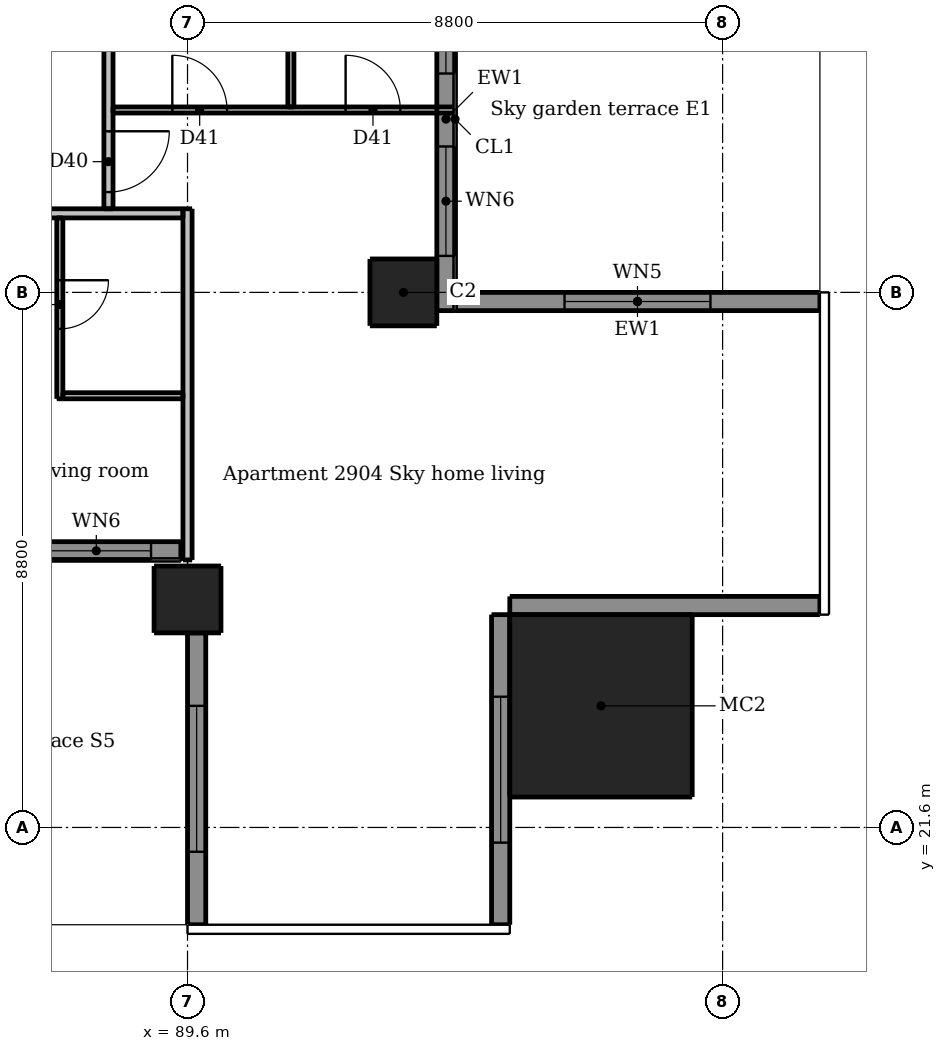
"""IFC4 building model, lengths in metres.
Left out: names, types, materials, properties, quantities, classifications, styles, units other than length and angle.
Written with IfcOpenShell. Run it as: python <this file> out.ifc"""

import sys

from ifc_helpers import new_model, si_unit, direction, frame, frame_2d, origin, origin_2d, place, context, subcontext, project, spatial, rectangle, extrude, element, fill, save


model = new_model("IFC4")
c1 = context("Model", 3, precision=1e-05, world=origin(), true_north=direction((0.0, 1.0)))
c2 = subcontext(c1, "Body", "Model", "MODEL_VIEW")
j1 = project(units=[si_unit("LENGTHUNIT", "METRE"), si_unit("PLANEANGLEUNIT", "RADIAN")], contexts=[c1])
p1 = place(None, origin())
s1 = spatial("IfcSite", under=j1, at=p1, CompositionType="ELEMENT")
p2 = place(p1, origin())
s2 = spatial("IfcBuilding", under=s1, at=p2, CompositionType="ELEMENT")
p3 = place(p2, frame((0.0, 0.0, 108.4)))
s3 = spatial("IfcBuildingStorey", under=s2, at=p3, CompositionType="ELEMENT", Elevation=108.4)
for number, where, z_axis, x_axis in (
    (1, (89.6, 25.35, 0.0), (0.0, 0.0, 1.0), (1.0, 0.0, 0.0)),
    (2, (93.15, 30.4, 0.0), (0.0, 0.0, 1.0), (1.0, 0.0, 0.0)),
):
    element("IfcColumn", number, at=place(p3, frame(where, z_axis=z_axis, x_axis=x_axis)), inside=s3, PredefinedType="COLUMN", context=c2, shape_type="SweptSolid", body=[
        extrude(rectangle(XDim=1.1, YDim=1.1, at=origin_2d()), origin(), (0.0, 0.0, 1.0), 3.05),
    ])
p4 = place(p3, frame((96.4, 23.6, 0.0), z_axis=(0.0, 0.0, 1.0), x_axis=(1.0, 0.0, 0.0)))
e3 = element("IfcColumn", 3, at=p4, inside=s3, PredefinedType="COLUMN", context=c2, shape_type="SweptSolid", body=[
    extrude(rectangle(XDim=3.0, YDim=3.0, at=origin_2d()), origin(), (0.0, 0.0, 1.0), 3.3),
])
p5 = place(p3, frame((89.75, 24.8, 0.0), z_axis=(0.0, 0.0, 1.0), x_axis=(0.0, -1.0, 0.0)))
e4 = element("IfcWall", 4, at=p5, inside=s3, PredefinedType="SOLIDWALL", context=c2, shape_type="SweptSolid", body=[
    extrude(rectangle(XDim=4.8, YDim=0.3, at=frame_2d((2.4, 0.0))), origin(), (0.0, 0.0, 1.0), 3.05),
])
p6 = place(p5, frame((1.2, 0.0, 0.15)))
e5 = element("IfcOpeningElement", 5, at=p6, cuts=e4, PredefinedType="OPENING", context=c2, shape_type="SweptSolid", body=[
    extrude(rectangle(XDim=2.4, YDim=2.1, at=frame_2d((1.2, 1.05))), frame((0.0, 0.16, 0.0), z_axis=(0.0, -1.0, 0.0), x_axis=(1.0, 0.0, 0.0)), (0.0, 0.0, 1.0), 0.32),
])
p7 = place(p3, frame((94.75, 20.0, 0.0), z_axis=(0.0, 0.0, 1.0), x_axis=(0.0, 1.0, 0.0)))
e6 = element("IfcWall", 6, at=p7, inside=s3, PredefinedType="SOLIDWALL", context=c2, shape_type="SweptSolid", body=[
    extrude(rectangle(XDim=5.1, YDim=0.3, at=frame_2d((2.55, 0.0))), origin(), (0.0, 0.0, 1.0), 3.05),
])
p8 = place(p7, frame((1.35, 0.0, 0.15)))
e7 = element("IfcOpeningElement", 7, at=p8, cuts=e6, PredefinedType="OPENING", context=c2, shape_type="SweptSolid", body=[
    extrude(rectangle(XDim=2.4, YDim=2.1, at=frame_2d((1.2, 1.05))), frame((0.0, 0.16, 0.0), z_axis=(0.0, -1.0, 0.0), x_axis=(1.0, 0.0, 0.0)), (0.0, 0.0, 1.0), 0.32),
])
p9 = place(p3, frame((94.9, 25.25, 0.0), z_axis=(0.0, 0.0, 1.0), x_axis=(1.0, 0.0, 0.0)))
e8 = element("IfcWall", 8, at=p9, inside=s3, PredefinedType="SOLIDWALL", context=c2, shape_type="SweptSolid", body=[
    extrude(rectangle(XDim=5.1, YDim=0.3, at=frame_2d((2.55, 0.0))), origin(), (0.0, 0.0, 1.0), 3.05),
])
p10 = place(p3, frame((100.0, 30.25, 0.0), z_axis=(0.0, 0.0, 1.0), x_axis=(-1.0, 0.0, 0.0)))
e9 = element("IfcWall", 9, at=p10, inside=s3, PredefinedType="SOLIDWALL", context=c2, shape_type="SweptSolid", body=[
    extrude(rectangle(XDim=6.0, YDim=0.3, at=frame_2d((3.0, 0.0))), origin(), (0.0, 0.0, 1.0), 3.05),
])
p11 = place(p10, frame((1.8, 0.0, 0.15)))
e10 = element("IfcOpeningElement", 10, at=p11, cuts=e9, PredefinedType="OPENING", context=c2, shape_type="SweptSolid", body=[
    extrude(rectangle(XDim=2.4, YDim=2.1, at=frame_2d((1.2, 1.05))), frame((0.0, 0.16, 0.0), z_axis=(0.0, -1.0, 0.0), x_axis=(1.0, 0.0, 0.0)), (0.0, 0.0, 1.0), 0.32),
])
p12 = place(p3, frame((83.6, 26.15, 0.0), z_axis=(0.0, 0.0, 1.0), x_axis=(1.0, 0.0, 0.0)))
e11 = element("IfcWall", 11, at=p12, inside=s3, PredefinedType="SOLIDWALL", context=c2, shape_type="SweptSolid", body=[
    extrude(rectangle(XDim=5.89, YDim=0.3, at=frame_2d((2.945, 0.0))), origin(), (0.0, 0.0, 1.0), 3.05),
])
p13 = place(p12, frame((0.6, 0.0, 0.15)))
e12 = element("IfcOpeningElement", 12, at=p13, cuts=e11, PredefinedType="OPENING", context=c2, shape_type="SweptSolid", body=[
    extrude(rectangle(XDim=1.8, YDim=2.1, at=frame_2d((0.9, 1.05))), frame((0.0, 0.16, 0.0), z_axis=(0.0, -1.0, 0.0), x_axis=(1.0, 0.0, 0.0)), (0.0, 0.0, 1.0), 0.32),
])
p14 = place(p12, frame((3.6, 0.0, 0.15)))
e13 = element("IfcOpeningElement", 13, at=p14, cuts=e11, PredefinedType="OPENING", context=c2, shape_type="SweptSolid", body=[
    extrude(rectangle(XDim=1.8, YDim=2.1, at=frame_2d((0.9, 1.05))), frame((0.0, 0.16, 0.0), z_axis=(0.0, -1.0, 0.0), x_axis=(1.0, 0.0, 0.0)), (0.0, 0.0, 1.0), 0.32),
])
p15 = place(p3, frame((93.85, 30.1, 0.0), z_axis=(0.0, 0.0, 1.0), x_axis=(0.0, 1.0, 0.0)))
e14 = element("IfcWall", 14, at=p15, inside=s3, PredefinedType="SOLIDWALL", context=c2, shape_type="SweptSolid", body=[
    extrude(rectangle(XDim=6.3, YDim=0.3, at=frame_2d((3.15, 0.0))), origin(), (0.0, 0.0, 1.0), 3.05),
])
p16 = place(p15, frame((0.9, 0.0, 0.15)))
e15 = element("IfcOpeningElement", 15, at=p16, cuts=e14, PredefinedType="OPENING", context=c2, shape_type="SweptSolid", body=[
    extrude(rectangle(XDim=1.8, YDim=2.1, at=frame_2d((0.9, 1.05))), frame((0.0, 0.16, 0.0), z_axis=(0.0, -1.0, 0.0), x_axis=(1.0, 0.0, 0.0)), (0.0, 0.0, 1.0), 0.32),
])
p17 = place(p15, frame((3.9, 0.0, 0.15)))
e16 = element("IfcOpeningElement", 16, at=p17, cuts=e14, PredefinedType="OPENING", context=c2, shape_type="SweptSolid", body=[
    extrude(rectangle(XDim=1.8, YDim=2.1, at=frame_2d((0.9, 1.05))), frame((0.0, 0.16, 0.0), z_axis=(0.0, -1.0, 0.0), x_axis=(1.0, 0.0, 0.0)), (0.0, 0.0, 1.0), 0.32),
])
p18 = place(p3, frame((87.5, 31.625, 0.0), z_axis=(0.0, 0.0, 1.0), x_axis=(0.0, -1.0, 0.0)))
e17 = element("IfcWall", 17, at=p18, inside=s3, PredefinedType="PARTITIONING", context=c2, shape_type="SweptSolid", body=[
    extrude(rectangle(XDim=2.975, YDim=0.1, at=frame_2d((1.488, 0.0))), origin(), (0.0, 0.0, 1.0), 3.05),
])
p19 = place(p18, frame((1.025, 0.0, 0.0)))
e18 = element("IfcOpeningElement", 18, at=p19, cuts=e17, PredefinedType="OPENING", context=c2, shape_type="SweptSolid", body=[
    extrude(rectangle(XDim=0.8, YDim=2.1, at=frame_2d((0.4, 1.05))), frame((0.0, 0.06, 0.0), z_axis=(0.0, -1.0, 0.0), x_axis=(1.0, 0.0, 0.0)), (0.0, 0.0, 1.0), 0.12),
])
p20 = place(p3, frame((91.3, 33.45, 0.0), z_axis=(0.0, 0.0, 1.0), x_axis=(0.0, 1.0, 0.0)))
e19 = element("IfcWall", 19, at=p20, inside=s3, PredefinedType="PARTITIONING", context=c2, shape_type="SweptSolid", body=[
    extrude(rectangle(XDim=5.875, YDim=0.1, at=frame_2d((2.938, 0.0))), origin(), (0.0, 0.0, 1.0), 3.05),
])
p21 = place(p20, frame((3.75, 0.0, 0.0)))
e20 = element("IfcOpeningElement", 20, at=p21, cuts=e19, PredefinedType="OPENING", context=c2, shape_type="SweptSolid", body=[
    extrude(rectangle(XDim=0.8, YDim=2.1, at=frame_2d((0.4, 1.05))), frame((0.0, 0.06, 0.0), z_axis=(0.0, -1.0, 0.0), x_axis=(1.0, 0.0, 0.0)), (0.0, 0.0, 1.0), 0.12),
])
p22 = place(p3, frame((88.375, 33.4, 0.0), z_axis=(0.0, 0.0, 1.0), x_axis=(1.0, 0.0, 0.0)))
e21 = element("IfcWall", 21, at=p22, inside=s3, PredefinedType="PARTITIONING", context=c2, shape_type="SweptSolid", body=[
    extrude(rectangle(XDim=5.625, YDim=0.1, at=frame_2d((2.812, 0.0))), origin(), (0.0, 0.0, 1.0), 3.05),
])
p23 = place(p22, frame((0.975, 0.0, 0.0)))
e22 = element("IfcOpeningElement", 22, at=p23, cuts=e21, PredefinedType="OPENING", context=c2, shape_type="SweptSolid", body=[
    extrude(rectangle(XDim=0.9, YDim=2.1, at=frame_2d((0.45, 1.05))), frame((0.0, 0.06, 0.0), z_axis=(0.0, -1.0, 0.0), x_axis=(1.0, 0.0, 0.0)), (0.0, 0.0, 1.0), 0.12),
])
p24 = place(p22, frame((3.825, 0.0, 0.0)))
e23 = element("IfcOpeningElement", 23, at=p24, cuts=e21, PredefinedType="OPENING", context=c2, shape_type="SweptSolid", body=[
    extrude(rectangle(XDim=0.9, YDim=2.1, at=frame_2d((0.45, 1.05))), frame((0.0, 0.06, 0.0), z_axis=(0.0, -1.0, 0.0), x_axis=(1.0, 0.0, 0.0)), (0.0, 0.0, 1.0), 0.12),
])
p25 = place(p3, frame((87.55, 28.7, 0.0), z_axis=(0.0, 0.0, 1.0), x_axis=(1.0, 0.0, 0.0)))
e24 = element("IfcWall", 24, at=p25, inside=s3, PredefinedType="PARTITIONING", context=c2, shape_type="SweptSolid", body=[
    extrude(rectangle(XDim=1.975, YDim=0.1, at=frame_2d((0.987, 0.0))), origin(), (0.0, 0.0, 1.0), 3.05),
])
p26 = place(p3, frame((88.3, 60.475, 0.0), z_axis=(0.0, 0.0, 1.0), x_axis=(0.0, -1.0, 0.0)))
e25 = element("IfcWall", 25, at=p26, inside=s3, PredefinedType="PARTITIONING", context=c2, shape_type="SweptSolid", body=[
    extrude(rectangle(XDim=28.7, YDim=0.15, at=frame_2d((14.35, 0.0))), origin(), (0.0, 0.0, 1.0), 3.05),
])
p27 = place(p26, frame((27.425, 0.0, 0.0)))
e26 = element("IfcOpeningElement", 26, at=p27, cuts=e25, PredefinedType="OPENING", context=c2, shape_type="SweptSolid", body=[
    extrude(rectangle(XDim=1.0, YDim=2.1, at=frame_2d((0.5, 1.05))), frame((0.0, 0.085, 0.0), z_axis=(0.0, -1.0, 0.0), x_axis=(1.0, 0.0, 0.0)), (0.0, 0.0, 1.0), 0.17),
])
p28 = place(p26, frame((14.575, 0.0, 0.0)))
e27 = element("IfcOpeningElement", 27, at=p28, cuts=e25, PredefinedType="OPENING", context=c2, shape_type="SweptSolid", body=[
    extrude(rectangle(XDim=1.0, YDim=2.1, at=frame_2d((0.5, 1.05))), frame((0.0, 0.085, 0.0), z_axis=(0.0, -1.0, 0.0), x_axis=(1.0, 0.0, 0.0)), (0.0, 0.0, 1.0), 0.17),
])
p29 = place(p26, frame((2.575, 0.0, 0.0)))
e28 = element("IfcOpeningElement", 28, at=p29, cuts=e25, PredefinedType="OPENING", context=c2, shape_type="SweptSolid", body=[
    extrude(rectangle(XDim=1.0, YDim=2.1, at=frame_2d((0.5, 1.05))), frame((0.0, 0.085, 0.0), z_axis=(0.0, -1.0, 0.0), x_axis=(1.0, 0.0, 0.0)), (0.0, 0.0, 1.0), 0.17),
])
p30 = place(p3, frame((89.6, 26.0, 0.0), z_axis=(0.0, 0.0, 1.0), x_axis=(0.0, 1.0, 0.0)))
e29 = element("IfcWall", 29, at=p30, inside=s3, PredefinedType="PARTITIONING", context=c2, shape_type="SweptSolid", body=[
    extrude(rectangle(XDim=5.775, YDim=0.15, at=frame_2d((2.887, 0.0))), origin(), (0.0, 0.0, 1.0), 2.516),
])
p31 = place(p3, frame((89.525, 31.7, 0.0), z_axis=(0.0, 0.0, 1.0), x_axis=(-1.0, 0.0, 0.0)))
e30 = element("IfcWall", 30, at=p31, inside=s3, PredefinedType="PARTITIONING", context=c2, shape_type="SweptSolid", body=[
    extrude(rectangle(XDim=28.75, YDim=0.15, at=frame_2d((14.375, 0.0))), origin(), (0.0, 0.0, 1.0), 3.05),
])
p32 = place(p31, frame((27.375, 0.0, 0.0)))
e31 = element("IfcOpeningElement", 31, at=p32, cuts=e30, PredefinedType="OPENING", context=c2, shape_type="SweptSolid", body=[
    extrude(rectangle(XDim=1.0, YDim=2.1, at=frame_2d((0.5, 1.05))), frame((0.0, 0.085, 0.0), z_axis=(0.0, -1.0, 0.0), x_axis=(1.0, 0.0, 0.0)), (0.0, 0.0, 1.0), 0.17),
])
p33 = place(p31, frame((12.625, 0.0, 0.0)))
e32 = element("IfcOpeningElement", 32, at=p33, cuts=e30, PredefinedType="OPENING", context=c2, shape_type="SweptSolid", body=[
    extrude(rectangle(XDim=1.0, YDim=2.1, at=frame_2d((0.5, 1.05))), frame((0.0, 0.085, 0.0), z_axis=(0.0, -1.0, 0.0), x_axis=(1.0, 0.0, 0.0)), (0.0, 0.0, 1.0), 0.17),
])
p34 = place(p31, frame((2.425, 0.0, 0.0)))
e33 = element("IfcOpeningElement", 33, at=p34, cuts=e30, PredefinedType="OPENING", context=c2, shape_type="SweptSolid", body=[
    extrude(rectangle(XDim=1.0, YDim=2.1, at=frame_2d((0.5, 1.05))), frame((0.0, 0.085, 0.0), z_axis=(0.0, -1.0, 0.0), x_axis=(1.0, 0.0, 0.0)), (0.0, 0.0, 1.0), 0.17),
])
p35 = place(p6, origin())
e34 = element("IfcWindow", 34, at=p35, inside=s3, PartitioningType="DOUBLE_PANEL_VERTICAL", PredefinedType="WINDOW", context=c2, shape_type="SweptSolid", body=[
    extrude(rectangle(XDim=2.4, YDim=2.1, at=frame_2d((1.2, 1.05))), frame((0.0, 0.03, 0.0), z_axis=(0.0, -1.0, 0.0), x_axis=(1.0, 0.0, 0.0)), (0.0, 0.0, 1.0), 0.06),
])
fill(e5, e34)
p36 = place(p8, origin())
e35 = element("IfcWindow", 35, at=p36, inside=s3, PartitioningType="DOUBLE_PANEL_VERTICAL", PredefinedType="WINDOW", context=c2, shape_type="SweptSolid", body=[
    extrude(rectangle(XDim=2.4, YDim=2.1, at=frame_2d((1.2, 1.05))), frame((0.0, 0.03, 0.0), z_axis=(0.0, -1.0, 0.0), x_axis=(1.0, 0.0, 0.0)), (0.0, 0.0, 1.0), 0.06),
])
fill(e7, e35)
p37 = place(p11, origin())
e36 = element("IfcWindow", 36, at=p37, inside=s3, PartitioningType="DOUBLE_PANEL_VERTICAL", PredefinedType="WINDOW", context=c2, shape_type="SweptSolid", body=[
    extrude(rectangle(XDim=2.4, YDim=2.1, at=frame_2d((1.2, 1.05))), frame((0.0, 0.03, 0.0), z_axis=(0.0, -1.0, 0.0), x_axis=(1.0, 0.0, 0.0)), (0.0, 0.0, 1.0), 0.06),
])
fill(e10, e36)
p38 = place(p14, origin())
e37 = element("IfcWindow", 37, at=p38, inside=s3, PartitioningType="DOUBLE_PANEL_VERTICAL", PredefinedType="WINDOW", context=c2, shape_type="SweptSolid", body=[
    extrude(rectangle(XDim=1.8, YDim=2.1, at=frame_2d((0.9, 1.05))), frame((0.0, 0.03, 0.0), z_axis=(0.0, -1.0, 0.0), x_axis=(1.0, 0.0, 0.0)), (0.0, 0.0, 1.0), 0.06),
])
fill(e13, e37)
p39 = place(p16, origin())
e38 = element("IfcWindow", 38, at=p39, inside=s3, PartitioningType="DOUBLE_PANEL_VERTICAL", PredefinedType="WINDOW", context=c2, shape_type="SweptSolid", body=[
    extrude(rectangle(XDim=1.8, YDim=2.1, at=frame_2d((0.9, 1.05))), frame((0.0, 0.03, 0.0), z_axis=(0.0, -1.0, 0.0), x_axis=(1.0, 0.0, 0.0)), (0.0, 0.0, 1.0), 0.06),
])
fill(e15, e38)
p40 = place(p17, origin())
e39 = element("IfcWindow", 39, at=p40, inside=s3, PartitioningType="DOUBLE_PANEL_VERTICAL", PredefinedType="WINDOW", context=c2, shape_type="SweptSolid", body=[
    extrude(rectangle(XDim=1.8, YDim=2.1, at=frame_2d((0.9, 1.05))), frame((0.0, 0.03, 0.0), z_axis=(0.0, -1.0, 0.0), x_axis=(1.0, 0.0, 0.0)), (0.0, 0.0, 1.0), 0.06),
])
fill(e16, e39)
p41 = place(p19, origin())
e40 = element("IfcDoor", 40, at=p41, inside=s3, OperationType="SINGLE_SWING_LEFT", PredefinedType="DOOR", context=c2, shape_type="SweptSolid", body=[
    extrude(rectangle(XDim=0.8, YDim=2.1, at=frame_2d((0.4, 1.05))), frame((0.0, 0.025, 0.0), z_axis=(0.0, -1.0, 0.0), x_axis=(1.0, 0.0, 0.0)), (0.0, 0.0, 1.0), 0.05),
])
fill(e18, e40)
p42 = place(p27, origin())
e41 = element("IfcDoor", 41, at=p42, inside=s3, OperationType="SINGLE_SWING_LEFT", PredefinedType="DOOR", context=c2, shape_type="SweptSolid", body=[
    extrude(rectangle(XDim=1.0, YDim=2.1, at=frame_2d((0.5, 1.05))), frame((0.0, 0.025, 0.0), z_axis=(0.0, -1.0, 0.0), x_axis=(1.0, 0.0, 0.0)), (0.0, 0.0, 1.0), 0.05),
])
fill(e26, e41)
p43 = place(p23, origin())
e42 = element("IfcDoor", 42, at=p43, inside=s3, OperationType="SINGLE_SWING_LEFT", PredefinedType="DOOR", context=c2, shape_type="SweptSolid", body=[
    extrude(rectangle(XDim=0.9, YDim=2.1, at=frame_2d((0.45, 1.05))), frame((0.0, 0.025, 0.0), z_axis=(0.0, -1.0, 0.0), x_axis=(1.0, 0.0, 0.0)), (0.0, 0.0, 1.0), 0.05),
])
fill(e22, e42)
p44 = place(p24, origin())
e43 = element("IfcDoor", 43, at=p44, inside=s3, OperationType="SINGLE_SWING_LEFT", PredefinedType="DOOR", context=c2, shape_type="SweptSolid", body=[
    extrude(rectangle(XDim=0.9, YDim=2.1, at=frame_2d((0.45, 1.05))), frame((0.0, 0.025, 0.0), z_axis=(0.0, -1.0, 0.0), x_axis=(1.0, 0.0, 0.0)), (0.0, 0.0, 1.0), 0.05),
])
fill(e23, e43)
save(model, sys.argv[1])
